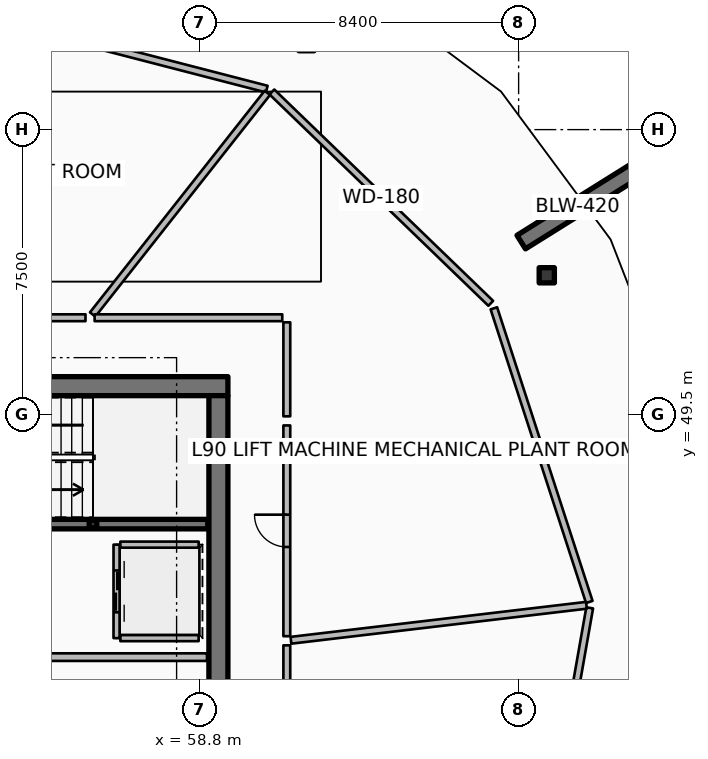
"""IFC4 building model, lengths in metres.
Left out: names, types, materials, properties, quantities, classifications, styles, units other than length and angle.
Written with IfcOpenShell. Run it as: python <this file> out.ifc"""

import sys

from ifc_helpers import new_model, si_unit, direction, frame, frame_2d, origin, origin_2d, place, context, subcontext, project, spatial, rectangle, hollow_rectangle, extrude, element, fill, save


model = new_model("IFC4")
c1 = context("Model", 3, precision=1e-05, world=origin(), true_north=direction((0.0, 1.0)))
c2 = subcontext(c1, "Body", "Model", "MODEL_VIEW")
j1 = project(units=[si_unit("LENGTHUNIT", "METRE"), si_unit("PLANEANGLEUNIT", "RADIAN")], contexts=[c1])
p1 = place(None, origin())
s1 = spatial("IfcSite", under=j1, at=p1, CompositionType="ELEMENT")
p2 = place(p1, origin())
s2 = spatial("IfcBuilding", under=s1, at=p2, CompositionType="ELEMENT")
p3 = place(p2, frame((0.0, 0.0, 359.6)))
s3 = spatial("IfcBuildingStorey", under=s2, at=p3, CompositionType="ELEMENT", Elevation=359.6)
p4 = place(p3, frame((49.95, 50.25, 0.0), z_axis=(0.0, 0.0, 1.0), x_axis=(1.0, 0.0, 0.0)))
e1 = element("IfcWall", 1, at=p4, inside=s3, PredefinedType="SHEAR", context=c2, shape_type="SweptSolid", body=[
    extrude(rectangle(XDim=9.6, YDim=0.5, at=frame_2d((4.8, 0.0))), origin(), (0.0, 0.0, 1.0), 3.6),
])
p5 = place(p3, frame((59.3, 34.0, 0.0), z_axis=(0.0, 0.0, 1.0), x_axis=(0.0, 1.0, 0.0)))
e2 = element("IfcWall", 2, at=p5, inside=s3, PredefinedType="SHEAR", context=c2, shape_type="SweptSolid", body=[
    extrude(rectangle(XDim=16.0, YDim=0.5, at=frame_2d((8.0, 0.0))), origin(), (0.0, 0.0, 1.0), 3.6),
])
p6 = place(p3, frame((56.0, 46.62, 0.0), z_axis=(0.0, 0.0, 1.0), x_axis=(1.0, 0.0, 0.0)))
e3 = element("IfcColumn", 3, at=p6, inside=s3, PredefinedType="COLUMN", context=c2, shape_type="SweptSolid", body=[
    extrude(hollow_rectangle(XDim=0.2, YDim=0.2, WallThickness=0.01, InnerFilletRadius=0.01, OuterFilletRadius=0.02, at=origin_2d()), origin(), (0.0, 0.0, 1.0), 1.595),
])
p7 = place(p3, frame((67.269, 54.041, 0.0), z_axis=(0.0, 0.0, 1.0), x_axis=(0.848033572426, 0.529942506352, 0.0)))
e4 = element("IfcWall", 4, at=p7, inside=s3, PredefinedType="SOLIDWALL", context=c2, shape_type="SweptSolid", body=[
    extrude(rectangle(XDim=3.5, YDim=0.42, at=frame_2d((1.75, 0.0))), origin(), (0.0, 0.0, 1.0), 3.6),
])
p8 = place(p3, frame((67.941, 53.167, 0.0), z_axis=(0.0, 0.0, 1.0), x_axis=(1.0, 0.0, 0.0)))
e5 = element("IfcColumn", 5, at=p8, inside=s3, PredefinedType="COLUMN", context=c2, shape_type="SweptSolid", body=[
    extrude(hollow_rectangle(XDim=0.4, YDim=0.4, WallThickness=0.02, InnerFilletRadius=0.02, OuterFilletRadius=0.04, at=origin_2d()), origin(), (0.0, 0.0, 1.0), 3.32),
])
p9 = place(p3, frame((51.48, 46.62, 0.0), z_axis=(0.0, 0.0, 1.0), x_axis=(1.0, 0.0, 0.0)))
e6 = element("IfcWall", 6, at=p9, inside=s3, PredefinedType="SOLIDWALL", context=c2, shape_type="SweptSolid", body=[
    extrude(rectangle(XDim=7.54, YDim=0.25, at=frame_2d((3.77, 0.0))), origin(), (0.0, 0.0, 1.0), 3.32),
])
p10 = place(p9, frame((0.3, 0.0, 0.0)))
e7 = element("IfcOpeningElement", 7, at=p10, cuts=e6, PredefinedType="OPENING", context=c2, shape_type="SweptSolid", body=[
    extrude(rectangle(XDim=1.55, YDim=2.15, at=frame_2d((0.775, 1.075))), frame((0.0, 0.135, 0.0), z_axis=(0.0, -1.0, 0.0), x_axis=(1.0, 0.0, 0.0)), (0.0, 0.0, 1.0), 0.27),
])
p11 = place(p3, frame((56.62, 46.08, 0.0), z_axis=(0.0, 0.0, 1.0), x_axis=(0.0, -1.0, 0.0)))
e8 = element("IfcWall", 8, at=p11, inside=s3, PredefinedType="PARTITIONING", context=c2, shape_type="SweptSolid", body=[
    extrude(rectangle(XDim=2.46, YDim=0.16, at=frame_2d((1.23, 0.0))), origin(), (0.0, 0.0, 1.0), 3.32),
])
p12 = place(p11, frame((0.68, 0.0, 0.0)))
e9 = element("IfcOpeningElement", 9, at=p12, cuts=e8, PredefinedType="OPENING", context=c2, shape_type="SweptSolid", body=[
    extrude(rectangle(XDim=1.1, YDim=2.1, at=frame_2d((0.55, 1.05))), frame((0.0, 0.09, 0.0), z_axis=(0.0, -1.0, 0.0), x_axis=(1.0, 0.0, 0.0)), (0.0, 0.0, 1.0), 0.18),
])
for number, where, z_axis, x_axis in (
    (10, (56.72, 46.08, 0.0), (0.0, 0.0, 1.0), (1.0, 0.0, 0.0)),
    (11, (56.72, 43.62, 0.0), (0.0, 0.0, 1.0), (1.0, 0.0, 0.0)),
):
    element("IfcWall", number, at=place(p3, frame(where, z_axis=z_axis, x_axis=x_axis)), inside=s3, PredefinedType="PARTITIONING", context=c2, shape_type="SweptSolid", body=[
        extrude(rectangle(XDim=2.06, YDim=0.16, at=frame_2d((1.03, 0.0))), origin(), (0.0, 0.0, 1.0), 3.32),
    ])
p13 = place(p3, frame((50.12, 43.12, 0.0), z_axis=(0.0, 0.0, 1.0), x_axis=(1.0, 0.0, 0.0)))
e12 = element("IfcWall", 12, at=p13, inside=s3, PredefinedType="PARTITIONING", context=c2, shape_type="SweptSolid", body=[
    extrude(rectangle(XDim=8.88, YDim=0.2, at=frame_2d((4.44, 0.0))), origin(), (0.0, 0.0, 1.0), 3.32),
])
p14 = place(p3, frame((66.467, 52.43, 0.0), z_axis=(0.0, 0.0, 1.0), x_axis=(-0.719364153135, 0.694633151516, 0.0)))
e13 = element("IfcWall", 13, at=p14, inside=s3, PredefinedType="PARTITIONING", context=c2, shape_type="SweptSolid", body=[
    extrude(rectangle(XDim=8.006, YDim=0.18, at=frame_2d((4.003, 0.0))), origin(), (0.0, 0.0, 1.0), 2.76),
])
p15 = place(p3, frame((60.573, 58.066, 0.0), z_axis=(0.0, 0.0, 1.0), x_axis=(-0.968117205342, 0.250497658115, 0.0)))
e14 = element("IfcWall", 14, at=p15, inside=s3, PredefinedType="PARTITIONING", context=c2, shape_type="SweptSolid", body=[
    extrude(rectangle(XDim=7.662, YDim=0.18, at=frame_2d((3.831, 0.0))), origin(), (0.0, 0.0, 1.0), 2.76),
])
p16 = place(p3, frame((67.68, 36.532, 0.0), z_axis=(0.0, 0.0, 1.0), x_axis=(0.173668776466, 0.984804120666, 0.0)))
e15 = element("IfcWall", 15, at=p16, inside=s3, PredefinedType="PARTITIONING", context=c2, shape_type="SweptSolid", body=[
    extrude(rectangle(XDim=8.006, YDim=0.18, at=frame_2d((4.003, 0.0))), origin(), (0.0, 0.0, 1.0), 2.76),
])
p17 = place(p3, frame((69.059, 44.572, 0.0), z_axis=(0.0, 0.0, 1.0), x_axis=(-0.309024234991, 0.951054163646, 0.0)))
e16 = element("IfcWall", 16, at=p17, inside=s3, PredefinedType="PARTITIONING", context=c2, shape_type="SweptSolid", body=[
    extrude(rectangle(XDim=8.124, YDim=0.18, at=frame_2d((4.062, 0.0))), origin(), (0.0, 0.0, 1.0), 2.76),
])
p18 = place(p3, frame((55.803, 52.05, 0.0), z_axis=(0.0, 0.0, 1.0), x_axis=(-1.0, 0.0, 0.0)))
e17 = element("IfcWall", 17, at=p18, inside=s3, PredefinedType="PARTITIONING", context=c2, shape_type="SweptSolid", body=[
    extrude(rectangle(XDim=4.848, YDim=0.18, at=frame_2d((2.424, 0.0))), origin(), (0.0, 0.0, 1.0), 2.76),
])
p19 = place(p18, frame((1.899, 0.0, 0.0)))
e18 = element("IfcOpeningElement", 18, at=p19, cuts=e17, PredefinedType="OPENING", context=c2, shape_type="SweptSolid", body=[
    extrude(rectangle(XDim=1.05, YDim=2.1, at=frame_2d((0.525, 1.05))), frame((0.0, 0.1, 0.0), z_axis=(0.0, -1.0, 0.0), x_axis=(1.0, 0.0, 0.0)), (0.0, 0.0, 1.0), 0.2),
])
p20 = place(p3, frame((55.991, 52.136, 0.0), z_axis=(0.0, 0.0, 1.0), x_axis=(0.619089811342, 0.785320192974, 0.0)))
e19 = element("IfcWall", 19, at=p20, inside=s3, PredefinedType="PARTITIONING", context=c2, shape_type="SweptSolid", body=[
    extrude(rectangle(XDim=7.426, YDim=0.18, at=frame_2d((3.713, 0.0))), origin(), (0.0, 0.0, 1.0), 2.76),
])
p21 = place(p3, frame((61.1, 38.425, 0.0), z_axis=(0.0, 0.0, 1.0), x_axis=(0.0, 1.0, 0.0)))
e20 = element("IfcWall", 20, at=p21, inside=s3, PredefinedType="PARTITIONING", context=c2, shape_type="SweptSolid", body=[
    extrude(rectangle(XDim=5.005, YDim=0.18, at=frame_2d((2.502, 0.0))), origin(), (0.0, 0.0, 1.0), 2.76),
])
p22 = place(p3, frame((61.209, 43.563, 0.0), z_axis=(0.0, 0.0, 1.0), x_axis=(0.993070558818, 0.117519637545, 0.0)))
e21 = element("IfcWall", 21, at=p22, inside=s3, PredefinedType="PARTITIONING", context=c2, shape_type="SweptSolid", body=[
    extrude(rectangle(XDim=7.83, YDim=0.18, at=frame_2d((3.915, 0.0))), origin(), (0.0, 0.0, 1.0), 2.76),
])
p23 = place(p3, frame((61.1, 43.67, 0.0), z_axis=(0.0, 0.0, 1.0), x_axis=(0.0, 1.0, 0.0)))
e22 = element("IfcWall", 22, at=p23, inside=s3, PredefinedType="PARTITIONING", context=c2, shape_type="SweptSolid", body=[
    extrude(rectangle(XDim=5.546, YDim=0.18, at=frame_2d((2.773, 0.0))), origin(), (0.0, 0.0, 1.0), 2.76),
])
p24 = place(p23, frame((2.348, 0.0, 0.0)))
e23 = element("IfcOpeningElement", 23, at=p24, cuts=e22, PredefinedType="OPENING", context=c2, shape_type="SweptSolid", body=[
    extrude(rectangle(XDim=0.85, YDim=2.06, at=frame_2d((0.425, 1.03))), frame((0.0, 0.1, 0.0), z_axis=(0.0, -1.0, 0.0), x_axis=(1.0, 0.0, 0.0)), (0.0, 0.0, 1.0), 0.2),
])
p25 = place(p3, frame((61.1, 49.456, 0.0), z_axis=(0.0, 0.0, 1.0), x_axis=(0.0, 1.0, 0.0)))
e24 = element("IfcWall", 24, at=p25, inside=s3, PredefinedType="PARTITIONING", context=c2, shape_type="SweptSolid", body=[
    extrude(rectangle(XDim=2.474, YDim=0.18, at=frame_2d((1.237, 0.0))), origin(), (0.0, 0.0, 1.0), 2.76),
])
p26 = place(p3, frame((60.98, 52.05, 0.0), z_axis=(0.0, 0.0, 1.0), x_axis=(-1.0, 0.0, 0.0)))
e25 = element("IfcWall", 25, at=p26, inside=s3, PredefinedType="PARTITIONING", context=c2, shape_type="SweptSolid", body=[
    extrude(rectangle(XDim=4.937, YDim=0.18, at=frame_2d((2.469, 0.0))), origin(), (0.0, 0.0, 1.0), 2.76),
])
p27 = place(p12, origin())
e26 = element("IfcDoor", 26, at=p27, inside=s3, OperationType="DOUBLE_DOOR_SLIDING", PredefinedType="DOOR", context=c2, shape_type="SweptSolid", body=[
    extrude(rectangle(XDim=1.1, YDim=2.1, at=frame_2d((0.55, 1.05))), frame((0.0, 0.025, 0.0), z_axis=(0.0, -1.0, 0.0), x_axis=(1.0, 0.0, 0.0)), (0.0, 0.0, 1.0), 0.05),
])
fill(e9, e26)
p28 = place(p24, origin())
e27 = element("IfcDoor", 27, at=p28, inside=s3, OperationType="SINGLE_SWING_RIGHT", PredefinedType="DOOR", context=c2, shape_type="SweptSolid", body=[
    extrude(rectangle(XDim=0.85, YDim=2.06, at=frame_2d((0.425, 1.03))), frame((0.0, 0.025, 0.0), z_axis=(0.0, -1.0, 0.0), x_axis=(1.0, 0.0, 0.0)), (0.0, 0.0, 1.0), 0.05),
])
fill(e23, e27)
save(model, sys.argv[1])
